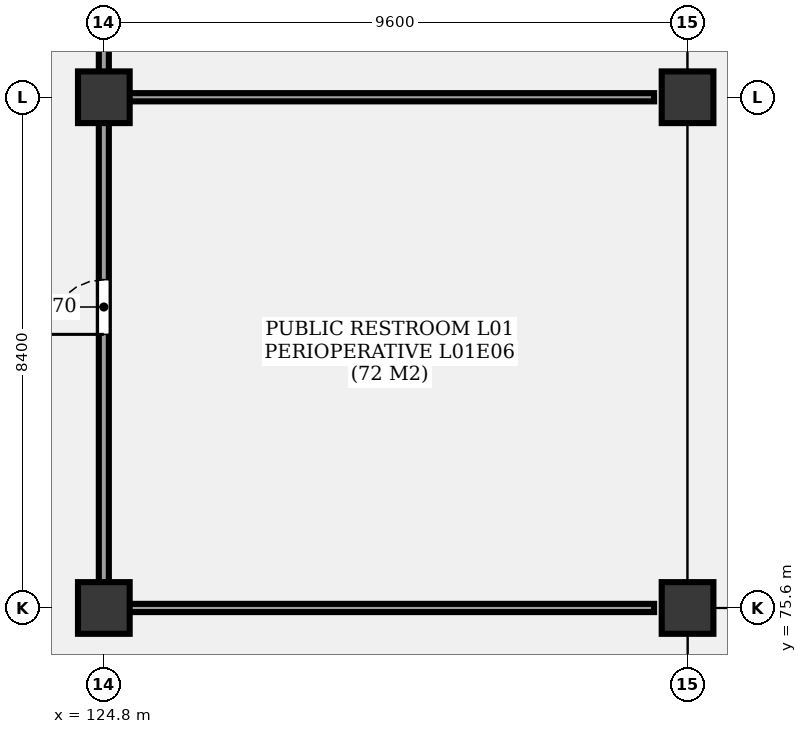
"""IFC4 building model, lengths in metres.
Left out: names, types, materials, properties, quantities, classifications, styles, units other than length and angle.
Written with IfcOpenShell. Run it as: python <this file> out.ifc"""

import sys

from ifc_helpers import new_model, si_unit, direction, frame, frame_2d, origin, origin_2d, place, context, subcontext, project, spatial, rectangle, extrude, element, fill, save


model = new_model("IFC4")
c1 = context("Model", 3, precision=1e-05, world=origin(), true_north=direction((0.0, 1.0)))
c2 = subcontext(c1, "Body", "Model", "MODEL_VIEW")
j1 = project(units=[si_unit("LENGTHUNIT", "METRE"), si_unit("PLANEANGLEUNIT", "RADIAN")], contexts=[c1])
p1 = place(None, origin())
s1 = spatial("IfcSite", under=j1, at=p1, CompositionType="ELEMENT")
p2 = place(p1, origin())
s2 = spatial("IfcBuilding", under=s1, at=p2, CompositionType="ELEMENT")
p3 = place(p2, frame((0.0, 0.0, 5.1)))
s3 = spatial("IfcBuildingStorey", under=s2, at=p3, CompositionType="ELEMENT", Elevation=5.1)
for number, where, z_axis, x_axis in (
    (1, (124.8, 75.6, 0.0), (0.0, 0.0, 1.0), (1.0, 0.0, 0.0)),
    (2, (124.8, 84.0, 0.0), (0.0, 0.0, 1.0), (1.0, 0.0, 0.0)),
    (3, (134.4, 75.6, 0.0), (0.0, 0.0, 1.0), (1.0, 0.0, 0.0)),
    (4, (134.4, 84.0, 0.0), (0.0, 0.0, 1.0), (1.0, 0.0, 0.0)),
):
    element("IfcColumn", number, at=place(p3, frame(where, z_axis=z_axis, x_axis=x_axis)), inside=s3, PredefinedType="COLUMN", context=c2, shape_type="SweptSolid", body=[
        extrude(rectangle(XDim=0.85, YDim=0.85, at=origin_2d()), origin(), (0.0, 0.0, 1.0), 4.8),
    ])
p4 = place(p3, frame((124.8, 75.85, 0.0), z_axis=(0.0, 0.0, 1.0), x_axis=(0.0, 1.0, 0.0)))
e5 = element("IfcWall", 5, at=p4, inside=s3, PredefinedType="PARTITIONING", context=c2, shape_type="SweptSolid", body=[
    extrude(rectangle(XDim=7.9, YDim=0.165, at=frame_2d((3.95, 0.0))), origin(), (0.0, 0.0, 1.0), 3.68),
])
p5 = place(p4, frame((4.25, 0.0, 0.0)))
e6 = element("IfcOpeningElement", 6, at=p5, cuts=e5, PredefinedType="OPENING", context=c2, shape_type="SweptSolid", body=[
    extrude(rectangle(XDim=0.9, YDim=2.1, at=frame_2d((0.45, 1.05))), frame((0.0, 0.093, 0.0), z_axis=(0.0, -1.0, 0.0), x_axis=(1.0, 0.0, 0.0)), (0.0, 0.0, 1.0), 0.185),
])
p6 = place(p3, frame((124.95, 75.6, 0.0), z_axis=(0.0, 0.0, 1.0), x_axis=(1.0, 0.0, 0.0)))
e7 = element("IfcWall", 7, at=p6, inside=s3, PredefinedType="PARTITIONING", context=c2, shape_type="SweptSolid", body=[
    extrude(rectangle(XDim=8.9, YDim=0.135, at=frame_2d((4.45, 0.0))), origin(), (0.0, 0.0, 1.0), 3.68),
])
p7 = place(p3, frame((124.8, 84.25, 0.0), z_axis=(0.0, 0.0, 1.0), x_axis=(0.0, 1.0, 0.0)))
e8 = element("IfcWall", 8, at=p7, inside=s3, PredefinedType="PARTITIONING", context=c2, shape_type="SweptSolid", body=[
    extrude(rectangle(XDim=7.9, YDim=0.165, at=frame_2d((3.95, 0.0))), origin(), (0.0, 0.0, 1.0), 3.68),
])
p8 = place(p7, frame((4.25, 0.0, 0.0)))
e9 = element("IfcOpeningElement", 9, at=p8, cuts=e8, PredefinedType="OPENING", context=c2, shape_type="SweptSolid", body=[
    extrude(rectangle(XDim=1.0, YDim=2.2, at=frame_2d((0.5, 1.1))), frame((0.0, 0.093, 0.0), z_axis=(0.0, -1.0, 0.0), x_axis=(1.0, 0.0, 0.0)), (0.0, 0.0, 1.0), 0.185),
])
p9 = place(p3, frame((124.95, 84.0, 0.0), z_axis=(0.0, 0.0, 1.0), x_axis=(1.0, 0.0, 0.0)))
e10 = element("IfcWall", 10, at=p9, inside=s3, PredefinedType="PARTITIONING", context=c2, shape_type="SweptSolid", body=[
    extrude(rectangle(XDim=8.9, YDim=0.135, at=frame_2d((4.45, 0.0))), origin(), (0.0, 0.0, 1.0), 3.68),
])
p10 = place(p5, origin())
e11 = element("IfcDoor", 11, at=p10, inside=s3, OperationType="SINGLE_SWING_LEFT", PredefinedType="DOOR", context=c2, shape_type="SweptSolid", body=[
    extrude(rectangle(XDim=0.9, YDim=2.1, at=frame_2d((0.45, 1.05))), frame((0.0, 0.025, 0.0), z_axis=(0.0, -1.0, 0.0), x_axis=(1.0, 0.0, 0.0)), (0.0, 0.0, 1.0), 0.05),
])
fill(e6, e11)
save(model, sys.argv[1])
